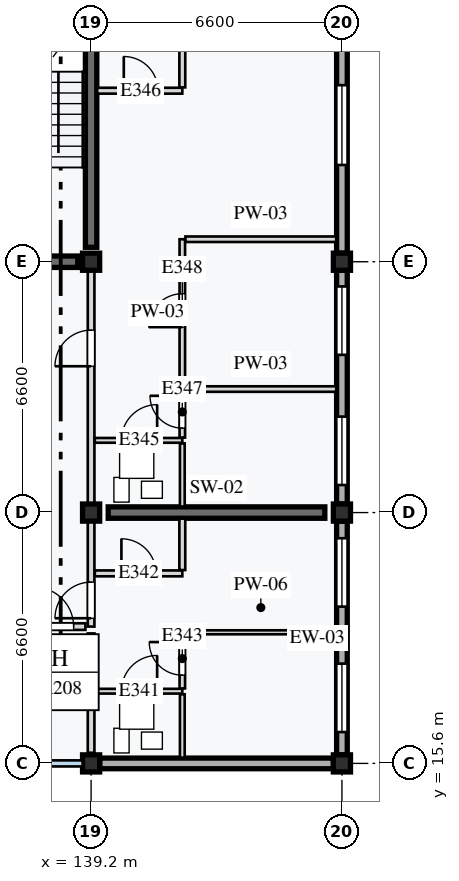
"""IFC4 building model, lengths in metres.
Left out: names, types, materials, properties, quantities, classifications, styles, units other than length and angle.
Written with IfcOpenShell. Run it as: python <this file> out.ifc"""

import sys

from ifc_helpers import new_model, si_unit, direction, frame, frame_2d, origin, origin_2d, place, context, subcontext, project, spatial, rectangle, extrude, element, fill, save


model = new_model("IFC4")
c1 = context("Model", 3, precision=1e-05, world=origin(), true_north=direction((0.0, 1.0)))
c2 = subcontext(c1, "Body", "Model", "MODEL_VIEW")
j1 = project(units=[si_unit("LENGTHUNIT", "METRE"), si_unit("PLANEANGLEUNIT", "RADIAN")], contexts=[c1])
p1 = place(None, origin())
s1 = spatial("IfcSite", under=j1, at=p1, CompositionType="ELEMENT")
p2 = place(p1, origin())
s2 = spatial("IfcBuilding", under=s1, at=p2, CompositionType="ELEMENT")
p3 = place(p2, frame((0.0, 0.0, 27.6)))
s3 = spatial("IfcBuildingStorey", under=s2, at=p3, CompositionType="ELEMENT", Elevation=27.6)
for number, where, z_axis, x_axis in (
    (1, (139.2, 15.6, 0.0), (0.0, 0.0, 1.0), (1.0, 0.0, 0.0)),
    (2, (145.8, 15.6, 0.0), (0.0, 0.0, 1.0), (1.0, 0.0, 0.0)),
    (3, (139.2, 22.2, 0.0), (0.0, 0.0, 1.0), (1.0, 0.0, 0.0)),
    (4, (145.8, 22.2, 0.0), (0.0, 0.0, 1.0), (1.0, 0.0, 0.0)),
    (5, (139.2, 28.8, 0.0), (0.0, 0.0, 1.0), (1.0, 0.0, 0.0)),
    (6, (145.8, 28.8, 0.0), (0.0, 0.0, 1.0), (1.0, 0.0, 0.0)),
):
    element("IfcColumn", number, at=place(p3, frame(where, z_axis=z_axis, x_axis=x_axis)), inside=s3, PredefinedType="COLUMN", context=c2, shape_type="SweptSolid", body=[
        extrude(rectangle(XDim=0.45, YDim=0.45, at=origin_2d()), origin(), (0.0, 0.0, 1.0), 3.2),
    ])
p4 = place(p3, frame((139.2, 29.18, 0.0), z_axis=(0.0, 0.0, 1.0), x_axis=(0.0, 1.0, 0.0)))
e7 = element("IfcWall", 7, at=p4, inside=s3, PredefinedType="SHEAR", context=c2, shape_type="SweptSolid", body=[
    extrude(rectangle(XDim=5.84, YDim=0.3, at=frame_2d((2.92, 0.0))), origin(), (0.0, 0.0, 1.0), 2.97),
])
p5 = place(p3, frame((136.05, 28.8, 0.0), z_axis=(0.0, 0.0, 1.0), x_axis=(1.0, 0.0, 0.0)))
e8 = element("IfcWall", 8, at=p5, inside=s3, PredefinedType="SHEAR", context=c2, shape_type="SweptSolid", body=[
    extrude(rectangle(XDim=2.8, YDim=0.3, at=frame_2d((1.4, 0.0))), origin(), (0.0, 0.0, 1.0), 2.97),
])
p6 = place(p3, frame((139.65, 22.2, 0.0), z_axis=(0.0, 0.0, 1.0), x_axis=(1.0, 0.0, 0.0)))
e9 = element("IfcWall", 9, at=p6, inside=s3, PredefinedType="SHEAR", context=c2, shape_type="SweptSolid", body=[
    extrude(rectangle(XDim=5.7, YDim=0.3, at=frame_2d((2.85, 0.0))), origin(), (0.0, 0.0, 1.0), 2.97),
])
p7 = place(p3, frame((145.8, 15.825, 0.0), z_axis=(0.0, 0.0, 1.0), x_axis=(0.0, 1.0, 0.0)))
e10 = element("IfcWall", 10, at=p7, inside=s3, PredefinedType="STANDARD", context=c2, shape_type="SweptSolid", body=[
    extrude(rectangle(XDim=6.15, YDim=0.28, at=frame_2d((3.075, 0.0))), origin(), (0.0, 0.0, 1.0), 2.65),
])
p8 = place(p7, frame((0.6, 0.0, 0.85)))
e11 = element("IfcOpeningElement", 11, at=p8, cuts=e10, PredefinedType="OPENING", context=c2, shape_type="SweptSolid", body=[
    extrude(rectangle(XDim=1.8, YDim=1.35, at=frame_2d((0.9, 0.675))), frame((0.0, 0.15, 0.0), z_axis=(0.0, -1.0, 0.0), x_axis=(1.0, 0.0, 0.0)), (0.0, 0.0, 1.0), 0.3),
])
p9 = place(p7, frame((3.9, 0.0, 0.85)))
e12 = element("IfcOpeningElement", 12, at=p9, cuts=e10, PredefinedType="OPENING", context=c2, shape_type="SweptSolid", body=[
    extrude(rectangle(XDim=1.8, YDim=1.55, at=frame_2d((0.9, 0.775))), frame((0.0, 0.15, 0.0), z_axis=(0.0, -1.0, 0.0), x_axis=(1.0, 0.0, 0.0)), (0.0, 0.0, 1.0), 0.3),
])
p10 = place(p3, frame((145.8, 22.425, 0.0), z_axis=(0.0, 0.0, 1.0), x_axis=(0.0, 1.0, 0.0)))
e13 = element("IfcWall", 13, at=p10, inside=s3, PredefinedType="STANDARD", context=c2, shape_type="SweptSolid", body=[
    extrude(rectangle(XDim=6.15, YDim=0.28, at=frame_2d((3.075, 0.0))), origin(), (0.0, 0.0, 1.0), 2.65),
])
p11 = place(p10, frame((0.5, 0.0, 0.85)))
e14 = element("IfcOpeningElement", 14, at=p11, cuts=e13, PredefinedType="OPENING", context=c2, shape_type="SweptSolid", body=[
    extrude(rectangle(XDim=1.8, YDim=1.35, at=frame_2d((0.9, 0.675))), frame((0.0, 0.15, 0.0), z_axis=(0.0, -1.0, 0.0), x_axis=(1.0, 0.0, 0.0)), (0.0, 0.0, 1.0), 0.3),
])
p12 = place(p10, frame((3.925, 0.0, 0.85)))
e15 = element("IfcOpeningElement", 15, at=p12, cuts=e13, PredefinedType="OPENING", context=c2, shape_type="SweptSolid", body=[
    extrude(rectangle(XDim=1.8, YDim=1.35, at=frame_2d((0.9, 0.675))), frame((0.0, 0.15, 0.0), z_axis=(0.0, -1.0, 0.0), x_axis=(1.0, 0.0, 0.0)), (0.0, 0.0, 1.0), 0.3),
])
p13 = place(p3, frame((145.8, 29.025, 0.0), z_axis=(0.0, 0.0, 1.0), x_axis=(0.0, 1.0, 0.0)))
e16 = element("IfcWall", 16, at=p13, inside=s3, PredefinedType="STANDARD", context=c2, shape_type="SweptSolid", body=[
    extrude(rectangle(XDim=6.15, YDim=0.28, at=frame_2d((3.075, 0.0))), origin(), (0.0, 0.0, 1.0), 2.65),
])
p14 = place(p13, frame((2.321, 0.0, 0.85)))
e17 = element("IfcOpeningElement", 17, at=p14, cuts=e16, PredefinedType="OPENING", context=c2, shape_type="SweptSolid", body=[
    extrude(rectangle(XDim=2.1, YDim=1.55, at=frame_2d((1.05, 0.775))), frame((0.0, 0.15, 0.0), z_axis=(0.0, -1.0, 0.0), x_axis=(1.0, 0.0, 0.0)), (0.0, 0.0, 1.0), 0.3),
])
p15 = place(p3, frame((139.425, 15.6, 0.0), z_axis=(0.0, 0.0, 1.0), x_axis=(1.0, 0.0, 0.0)))
e18 = element("IfcWall", 18, at=p15, inside=s3, PredefinedType="STANDARD", context=c2, shape_type="SweptSolid", body=[
    extrude(rectangle(XDim=6.15, YDim=0.28, at=frame_2d((3.075, 0.0))), origin(), (0.0, 0.0, 1.0), 2.65),
])
p16 = place(p3, frame((136.05, 19.2, 0.0), z_axis=(0.0, 0.0, 1.0), x_axis=(1.0, 0.0, 0.0)))
e19 = element("IfcWall", 19, at=p16, inside=s3, PredefinedType="PARTITIONING", context=c2, shape_type="SweptSolid", body=[
    extrude(rectangle(XDim=3.0, YDim=0.175, at=frame_2d((1.5, 0.0))), origin(), (0.0, 0.0, 1.0), 2.97),
])
p17 = place(p16, frame((1.65, 0.0, 0.0)))
e20 = element("IfcOpeningElement", 20, at=p17, cuts=e19, PredefinedType="OPENING", context=c2, shape_type="SweptSolid", body=[
    extrude(rectangle(XDim=1.04, YDim=2.12, at=frame_2d((0.52, 1.06))), frame((0.0, 0.097, 0.0), z_axis=(0.0, -1.0, 0.0), x_axis=(1.0, 0.0, 0.0)), (0.0, 0.0, 1.0), 0.195),
])
p18 = place(p3, frame((139.2, 15.88, 0.0), z_axis=(0.0, 0.0, 1.0), x_axis=(0.0, 1.0, 0.0)))
e21 = element("IfcWall", 21, at=p18, inside=s3, PredefinedType="PARTITIONING", context=c2, shape_type="SweptSolid", body=[
    extrude(rectangle(XDim=3.14, YDim=0.175, at=frame_2d((1.57, 0.0))), origin(), (0.0, 0.0, 1.0), 2.55),
])
p19 = place(p3, frame((139.2, 19.2, 0.0), z_axis=(0.0, 0.0, 1.0), x_axis=(0.0, 1.0, 0.0)))
e22 = element("IfcWall", 22, at=p19, inside=s3, PredefinedType="PARTITIONING", context=c2, shape_type="SweptSolid", body=[
    extrude(rectangle(XDim=3.0, YDim=0.175, at=frame_2d((1.5, 0.0))), origin(), (0.0, 0.0, 1.0), 2.55),
])
p20 = place(p19, frame((0.22, 0.0, 0.0)))
e23 = element("IfcOpeningElement", 23, at=p20, cuts=e22, PredefinedType="OPENING", context=c2, shape_type="SweptSolid", body=[
    extrude(rectangle(XDim=0.95, YDim=2.1, at=frame_2d((0.475, 1.05))), frame((0.0, 0.097, 0.0), z_axis=(0.0, -1.0, 0.0), x_axis=(1.0, 0.0, 0.0)), (0.0, 0.0, 1.0), 0.195),
])
p21 = place(p3, frame((139.298, 17.5, 0.0), z_axis=(0.0, 0.0, 1.0), x_axis=(1.0, 0.0, 0.0)))
e24 = element("IfcWall", 24, at=p21, inside=s3, PredefinedType="PARTITIONING", context=c2, shape_type="SweptSolid", body=[
    extrude(rectangle(XDim=2.302, YDim=0.125, at=frame_2d((1.151, 0.0))), origin(), (0.0, 0.0, 1.0), 2.97),
])
p22 = place(p21, frame((0.7, 0.0, 0.0)))
e25 = element("IfcOpeningElement", 25, at=p22, cuts=e24, PredefinedType="OPENING", context=c2, shape_type="SweptSolid", body=[
    extrude(rectangle(XDim=0.94, YDim=2.08, at=frame_2d((0.47, 1.04))), frame((0.0, 0.073, 0.0), z_axis=(0.0, -1.0, 0.0), x_axis=(1.0, 0.0, 0.0)), (0.0, 0.0, 1.0), 0.145),
])
p23 = place(p3, frame((141.6, 15.75, 0.0), z_axis=(0.0, 0.0, 1.0), x_axis=(0.0, 1.0, 0.0)))
e26 = element("IfcWall", 26, at=p23, inside=s3, PredefinedType="PARTITIONING", context=c2, shape_type="SweptSolid", body=[
    extrude(rectangle(XDim=1.67, YDim=0.125, at=frame_2d((0.835, 0.0))), origin(), (0.0, 0.0, 1.0), 2.97),
])
p24 = place(p3, frame((139.298, 20.6, 0.0), z_axis=(0.0, 0.0, 1.0), x_axis=(1.0, 0.0, 0.0)))
e27 = element("IfcWall", 27, at=p24, inside=s3, PredefinedType="PARTITIONING", context=c2, shape_type="SweptSolid", body=[
    extrude(rectangle(XDim=2.302, YDim=0.155, at=frame_2d((1.151, 0.0))), origin(), (0.0, 0.0, 1.0), 2.97),
])
p25 = place(p24, frame((0.7, 0.0, 0.0)))
e28 = element("IfcOpeningElement", 28, at=p25, cuts=e27, PredefinedType="OPENING", context=c2, shape_type="SweptSolid", body=[
    extrude(rectangle(XDim=0.91, YDim=2.14, at=frame_2d((0.455, 1.07))), frame((0.0, 0.087, 0.0), z_axis=(0.0, -1.0, 0.0), x_axis=(1.0, 0.0, 0.0)), (0.0, 0.0, 1.0), 0.175),
])
p26 = place(p3, frame((141.6, 20.688, 0.0), z_axis=(0.0, 0.0, 1.0), x_axis=(0.0, 1.0, 0.0)))
e29 = element("IfcWall", 29, at=p26, inside=s3, PredefinedType="PARTITIONING", context=c2, shape_type="SweptSolid", body=[
    extrude(rectangle(XDim=1.353, YDim=0.155, at=frame_2d((0.676, 0.0))), origin(), (0.0, 0.0, 1.0), 2.97),
])
p27 = place(p3, frame((141.6, 17.573, 0.0), z_axis=(0.0, 0.0, 1.0), x_axis=(0.0, 1.0, 0.0)))
e30 = element("IfcWall", 30, at=p27, inside=s3, PredefinedType="PARTITIONING", context=c2, shape_type="SweptSolid", body=[
    extrude(rectangle(XDim=1.478, YDim=0.145, at=frame_2d((0.739, 0.0))), origin(), (0.0, 0.0, 1.0), 2.97),
])
p28 = place(p27, frame((0.35, 0.0, 0.0)))
e31 = element("IfcOpeningElement", 31, at=p28, cuts=e30, PredefinedType="OPENING", context=c2, shape_type="SweptSolid", body=[
    extrude(rectangle(XDim=0.87, YDim=2.08, at=frame_2d((0.435, 1.04))), frame((0.0, 0.083, 0.0), z_axis=(0.0, -1.0, 0.0), x_axis=(1.0, 0.0, 0.0)), (0.0, 0.0, 1.0), 0.165),
])
p29 = place(p3, frame((141.683, 19.05, 0.0), z_axis=(0.0, 0.0, 1.0), x_axis=(1.0, 0.0, 0.0)))
e32 = element("IfcWall", 32, at=p29, inside=s3, PredefinedType="PARTITIONING", context=c2, shape_type="SweptSolid", body=[
    extrude(rectangle(XDim=3.967, YDim=0.105, at=frame_2d((1.984, 0.0))), origin(), (0.0, 0.0, 1.0), 2.97),
])
p30 = place(p3, frame((139.2, 22.2, 0.0), z_axis=(0.0, 0.0, 1.0), x_axis=(0.0, 1.0, 0.0)))
e33 = element("IfcWall", 33, at=p30, inside=s3, PredefinedType="PARTITIONING", context=c2, shape_type="SweptSolid", body=[
    extrude(rectangle(XDim=6.6, YDim=0.175, at=frame_2d((3.3, 0.0))), origin(), (0.0, 0.0, 1.0), 2.55),
])
p31 = place(p30, frame((3.85, 0.0, 0.0)))
e34 = element("IfcOpeningElement", 34, at=p31, cuts=e33, PredefinedType="OPENING", context=c2, shape_type="SweptSolid", body=[
    extrude(rectangle(XDim=0.95, YDim=2.1, at=frame_2d((0.475, 1.05))), frame((0.0, 0.097, 0.0), z_axis=(0.0, -1.0, 0.0), x_axis=(1.0, 0.0, 0.0)), (0.0, 0.0, 1.0), 0.195),
])
p32 = place(p3, frame((139.298, 24.1, 0.0), z_axis=(0.0, 0.0, 1.0), x_axis=(1.0, 0.0, 0.0)))
e35 = element("IfcWall", 35, at=p32, inside=s3, PredefinedType="PARTITIONING", context=c2, shape_type="SweptSolid", body=[
    extrude(rectangle(XDim=2.302, YDim=0.125, at=frame_2d((1.151, 0.0))), origin(), (0.0, 0.0, 1.0), 2.97),
])
p33 = place(p32, frame((0.7, 0.0, 0.0)))
e36 = element("IfcOpeningElement", 36, at=p33, cuts=e35, PredefinedType="OPENING", context=c2, shape_type="SweptSolid", body=[
    extrude(rectangle(XDim=0.94, YDim=2.08, at=frame_2d((0.47, 1.04))), frame((0.0, 0.073, 0.0), z_axis=(0.0, -1.0, 0.0), x_axis=(1.0, 0.0, 0.0)), (0.0, 0.0, 1.0), 0.145),
])
p34 = place(p3, frame((141.6, 22.36, 0.0), z_axis=(0.0, 0.0, 1.0), x_axis=(0.0, 1.0, 0.0)))
e37 = element("IfcWall", 37, at=p34, inside=s3, PredefinedType="PARTITIONING", context=c2, shape_type="SweptSolid", body=[
    extrude(rectangle(XDim=1.66, YDim=0.125, at=frame_2d((0.83, 0.0))), origin(), (0.0, 0.0, 1.0), 2.97),
])
p35 = place(p3, frame((139.36, 33.3, 0.0), z_axis=(0.0, 0.0, 1.0), x_axis=(1.0, 0.0, 0.0)))
e38 = element("IfcWall", 38, at=p35, inside=s3, PredefinedType="PARTITIONING", context=c2, shape_type="SweptSolid", body=[
    extrude(rectangle(XDim=2.24, YDim=0.155, at=frame_2d((1.12, 0.0))), origin(), (0.0, 0.0, 1.0), 2.97),
])
p36 = place(p35, frame((0.7, 0.0, 0.0)))
e39 = element("IfcOpeningElement", 39, at=p36, cuts=e38, PredefinedType="OPENING", context=c2, shape_type="SweptSolid", body=[
    extrude(rectangle(XDim=0.9, YDim=2.16, at=frame_2d((0.45, 1.08))), frame((0.0, 0.087, 0.0), z_axis=(0.0, -1.0, 0.0), x_axis=(1.0, 0.0, 0.0)), (0.0, 0.0, 1.0), 0.175),
])
p37 = place(p3, frame((141.6, 33.387, 0.0), z_axis=(0.0, 0.0, 1.0), x_axis=(0.0, 1.0, 0.0)))
e40 = element("IfcWall", 40, at=p37, inside=s3, PredefinedType="PARTITIONING", context=c2, shape_type="SweptSolid", body=[
    extrude(rectangle(XDim=1.853, YDim=0.155, at=frame_2d((0.926, 0.0))), origin(), (0.0, 0.0, 1.0), 2.97),
])
p38 = place(p3, frame((141.6, 24.173, 0.0), z_axis=(0.0, 0.0, 1.0), x_axis=(0.0, 1.0, 0.0)))
e41 = element("IfcWall", 41, at=p38, inside=s3, PredefinedType="PARTITIONING", context=c2, shape_type="SweptSolid", body=[
    extrude(rectangle(XDim=1.277, YDim=0.145, at=frame_2d((0.639, 0.0))), origin(), (0.0, 0.0, 1.0), 2.97),
])
p39 = place(p38, frame((0.25, 0.0, 0.0)))
e42 = element("IfcOpeningElement", 42, at=p39, cuts=e41, PredefinedType="OPENING", context=c2, shape_type="SweptSolid", body=[
    extrude(rectangle(XDim=0.85, YDim=2.1, at=frame_2d((0.425, 1.05))), frame((0.0, 0.083, 0.0), z_axis=(0.0, -1.0, 0.0), x_axis=(1.0, 0.0, 0.0)), (0.0, 0.0, 1.0), 0.165),
])
p40 = place(p3, frame((141.683, 25.45, 0.0), z_axis=(0.0, 0.0, 1.0), x_axis=(1.0, 0.0, 0.0)))
e43 = element("IfcWall", 43, at=p40, inside=s3, PredefinedType="PARTITIONING", context=c2, shape_type="SweptSolid", body=[
    extrude(rectangle(XDim=3.967, YDim=0.145, at=frame_2d((1.984, 0.0))), origin(), (0.0, 0.0, 1.0), 2.97),
])
p41 = place(p3, frame((141.6, 25.532, 0.0), z_axis=(0.0, 0.0, 1.0), x_axis=(0.0, 1.0, 0.0)))
e44 = element("IfcWall", 44, at=p41, inside=s3, PredefinedType="PARTITIONING", context=c2, shape_type="SweptSolid", body=[
    extrude(rectangle(XDim=3.86, YDim=0.145, at=frame_2d((1.93, 0.0))), origin(), (0.0, 0.0, 1.0), 2.97),
])
p42 = place(p41, frame((1.546, 0.0, 0.0)))
e45 = element("IfcOpeningElement", 45, at=p42, cuts=e44, PredefinedType="OPENING", context=c2, shape_type="SweptSolid", body=[
    extrude(rectangle(XDim=0.88, YDim=2.1, at=frame_2d((0.44, 1.05))), frame((0.0, 0.083, 0.0), z_axis=(0.0, -1.0, 0.0), x_axis=(1.0, 0.0, 0.0)), (0.0, 0.0, 1.0), 0.165),
])
p43 = place(p3, frame((141.683, 29.392, 0.0), z_axis=(0.0, 0.0, 1.0), x_axis=(1.0, 0.0, 0.0)))
e46 = element("IfcWall", 46, at=p43, inside=s3, PredefinedType="PARTITIONING", context=c2, shape_type="SweptSolid", body=[
    extrude(rectangle(XDim=3.967, YDim=0.145, at=frame_2d((1.984, 0.0))), origin(), (0.0, 0.0, 1.0), 2.97),
])
p44 = place(p8, origin())
e47 = element("IfcWindow", 47, at=p44, inside=s3, PartitioningType="SINGLE_PANEL", PredefinedType="WINDOW", context=c2, shape_type="SweptSolid", body=[
    extrude(rectangle(XDim=1.8, YDim=1.35, at=frame_2d((0.9, 0.675))), frame((0.0, 0.03, 0.0), z_axis=(0.0, -1.0, 0.0), x_axis=(1.0, 0.0, 0.0)), (0.0, 0.0, 1.0), 0.06),
])
fill(e11, e47)
p45 = place(p9, origin())
e48 = element("IfcWindow", 48, at=p45, inside=s3, PartitioningType="SINGLE_PANEL", PredefinedType="WINDOW", context=c2, shape_type="SweptSolid", body=[
    extrude(rectangle(XDim=1.8, YDim=1.55, at=frame_2d((0.9, 0.775))), frame((0.0, 0.03, 0.0), z_axis=(0.0, -1.0, 0.0), x_axis=(1.0, 0.0, 0.0)), (0.0, 0.0, 1.0), 0.06),
])
fill(e12, e48)
p46 = place(p11, origin())
e49 = element("IfcWindow", 49, at=p46, inside=s3, PartitioningType="SINGLE_PANEL", PredefinedType="WINDOW", context=c2, shape_type="SweptSolid", body=[
    extrude(rectangle(XDim=1.8, YDim=1.35, at=frame_2d((0.9, 0.675))), frame((0.0, 0.03, 0.0), z_axis=(0.0, -1.0, 0.0), x_axis=(1.0, 0.0, 0.0)), (0.0, 0.0, 1.0), 0.06),
])
fill(e14, e49)
p47 = place(p12, origin())
e50 = element("IfcWindow", 50, at=p47, inside=s3, PartitioningType="SINGLE_PANEL", PredefinedType="WINDOW", context=c2, shape_type="SweptSolid", body=[
    extrude(rectangle(XDim=1.8, YDim=1.35, at=frame_2d((0.9, 0.675))), frame((0.0, 0.03, 0.0), z_axis=(0.0, -1.0, 0.0), x_axis=(1.0, 0.0, 0.0)), (0.0, 0.0, 1.0), 0.06),
])
fill(e15, e50)
p48 = place(p14, origin())
e51 = element("IfcWindow", 51, at=p48, inside=s3, PartitioningType="SINGLE_PANEL", PredefinedType="WINDOW", context=c2, shape_type="SweptSolid", body=[
    extrude(rectangle(XDim=2.1, YDim=1.55, at=frame_2d((1.05, 0.775))), frame((0.0, 0.03, 0.0), z_axis=(0.0, -1.0, 0.0), x_axis=(1.0, 0.0, 0.0)), (0.0, 0.0, 1.0), 0.06),
])
fill(e17, e51)
p49 = place(p17, origin())
e52 = element("IfcDoor", 52, at=p49, inside=s3, OperationType="SINGLE_SWING_LEFT", PredefinedType="DOOR", context=c2, shape_type="SweptSolid", body=[
    extrude(rectangle(XDim=1.04, YDim=2.12, at=frame_2d((0.52, 1.06))), frame((0.0, 0.025, 0.0), z_axis=(0.0, -1.0, 0.0), x_axis=(1.0, 0.0, 0.0)), (0.0, 0.0, 1.0), 0.05),
])
fill(e20, e52)
p50 = place(p20, origin())
e53 = element("IfcDoor", 53, at=p50, inside=s3, OperationType="SINGLE_SWING_LEFT", PredefinedType="DOOR", context=c2, shape_type="SweptSolid", body=[
    extrude(rectangle(XDim=0.95, YDim=2.1, at=frame_2d((0.475, 1.05))), frame((0.0, 0.025, 0.0), z_axis=(0.0, -1.0, 0.0), x_axis=(1.0, 0.0, 0.0)), (0.0, 0.0, 1.0), 0.05),
])
fill(e23, e53)
p51 = place(p22, origin())
e54 = element("IfcDoor", 54, at=p51, inside=s3, OperationType="SINGLE_SWING_RIGHT", PredefinedType="DOOR", context=c2, shape_type="SweptSolid", body=[
    extrude(rectangle(XDim=0.94, YDim=2.08, at=frame_2d((0.47, 1.04))), frame((0.0, 0.025, 0.0), z_axis=(0.0, -1.0, 0.0), x_axis=(1.0, 0.0, 0.0)), (0.0, 0.0, 1.0), 0.05),
])
fill(e25, e54)
p52 = place(p25, origin())
e55 = element("IfcDoor", 55, at=p52, inside=s3, OperationType="SINGLE_SWING_LEFT", PredefinedType="DOOR", context=c2, shape_type="SweptSolid", body=[
    extrude(rectangle(XDim=0.91, YDim=2.14, at=frame_2d((0.455, 1.07))), frame((0.0, 0.025, 0.0), z_axis=(0.0, -1.0, 0.0), x_axis=(1.0, 0.0, 0.0)), (0.0, 0.0, 1.0), 0.05),
])
fill(e28, e55)
p53 = place(p28, origin())
e56 = element("IfcDoor", 56, at=p53, inside=s3, OperationType="SINGLE_SWING_RIGHT", PredefinedType="DOOR", context=c2, shape_type="SweptSolid", body=[
    extrude(rectangle(XDim=0.87, YDim=2.08, at=frame_2d((0.435, 1.04))), frame((0.0, 0.025, 0.0), z_axis=(0.0, -1.0, 0.0), x_axis=(1.0, 0.0, 0.0)), (0.0, 0.0, 1.0), 0.05),
])
fill(e31, e56)
p54 = place(p31, origin())
e57 = element("IfcDoor", 57, at=p54, inside=s3, OperationType="SINGLE_SWING_LEFT", PredefinedType="DOOR", context=c2, shape_type="SweptSolid", body=[
    extrude(rectangle(XDim=0.95, YDim=2.1, at=frame_2d((0.475, 1.05))), frame((0.0, 0.025, 0.0), z_axis=(0.0, -1.0, 0.0), x_axis=(1.0, 0.0, 0.0)), (0.0, 0.0, 1.0), 0.05),
])
fill(e34, e57)
p55 = place(p33, origin())
e58 = element("IfcDoor", 58, at=p55, inside=s3, OperationType="SINGLE_SWING_RIGHT", PredefinedType="DOOR", context=c2, shape_type="SweptSolid", body=[
    extrude(rectangle(XDim=0.94, YDim=2.08, at=frame_2d((0.47, 1.04))), frame((0.0, 0.025, 0.0), z_axis=(0.0, -1.0, 0.0), x_axis=(1.0, 0.0, 0.0)), (0.0, 0.0, 1.0), 0.05),
])
fill(e36, e58)
p56 = place(p36, origin())
e59 = element("IfcDoor", 59, at=p56, inside=s3, OperationType="SINGLE_SWING_LEFT", PredefinedType="DOOR", context=c2, shape_type="SweptSolid", body=[
    extrude(rectangle(XDim=0.9, YDim=2.16, at=frame_2d((0.45, 1.08))), frame((0.0, 0.025, 0.0), z_axis=(0.0, -1.0, 0.0), x_axis=(1.0, 0.0, 0.0)), (0.0, 0.0, 1.0), 0.05),
])
fill(e39, e59)
p57 = place(p39, origin())
e60 = element("IfcDoor", 60, at=p57, inside=s3, OperationType="SINGLE_SWING_RIGHT", PredefinedType="DOOR", context=c2, shape_type="SweptSolid", body=[
    extrude(rectangle(XDim=0.85, YDim=2.1, at=frame_2d((0.425, 1.05))), frame((0.0, 0.025, 0.0), z_axis=(0.0, -1.0, 0.0), x_axis=(1.0, 0.0, 0.0)), (0.0, 0.0, 1.0), 0.05),
])
fill(e42, e60)
p58 = place(p42, origin())
e61 = element("IfcDoor", 61, at=p58, inside=s3, OperationType="SINGLE_SWING_LEFT", PredefinedType="DOOR", context=c2, shape_type="SweptSolid", body=[
    extrude(rectangle(XDim=0.88, YDim=2.1, at=frame_2d((0.44, 1.05))), frame((0.0, 0.025, 0.0), z_axis=(0.0, -1.0, 0.0), x_axis=(1.0, 0.0, 0.0)), (0.0, 0.0, 1.0), 0.05),
])
fill(e45, e61)
save(model, sys.argv[1])
